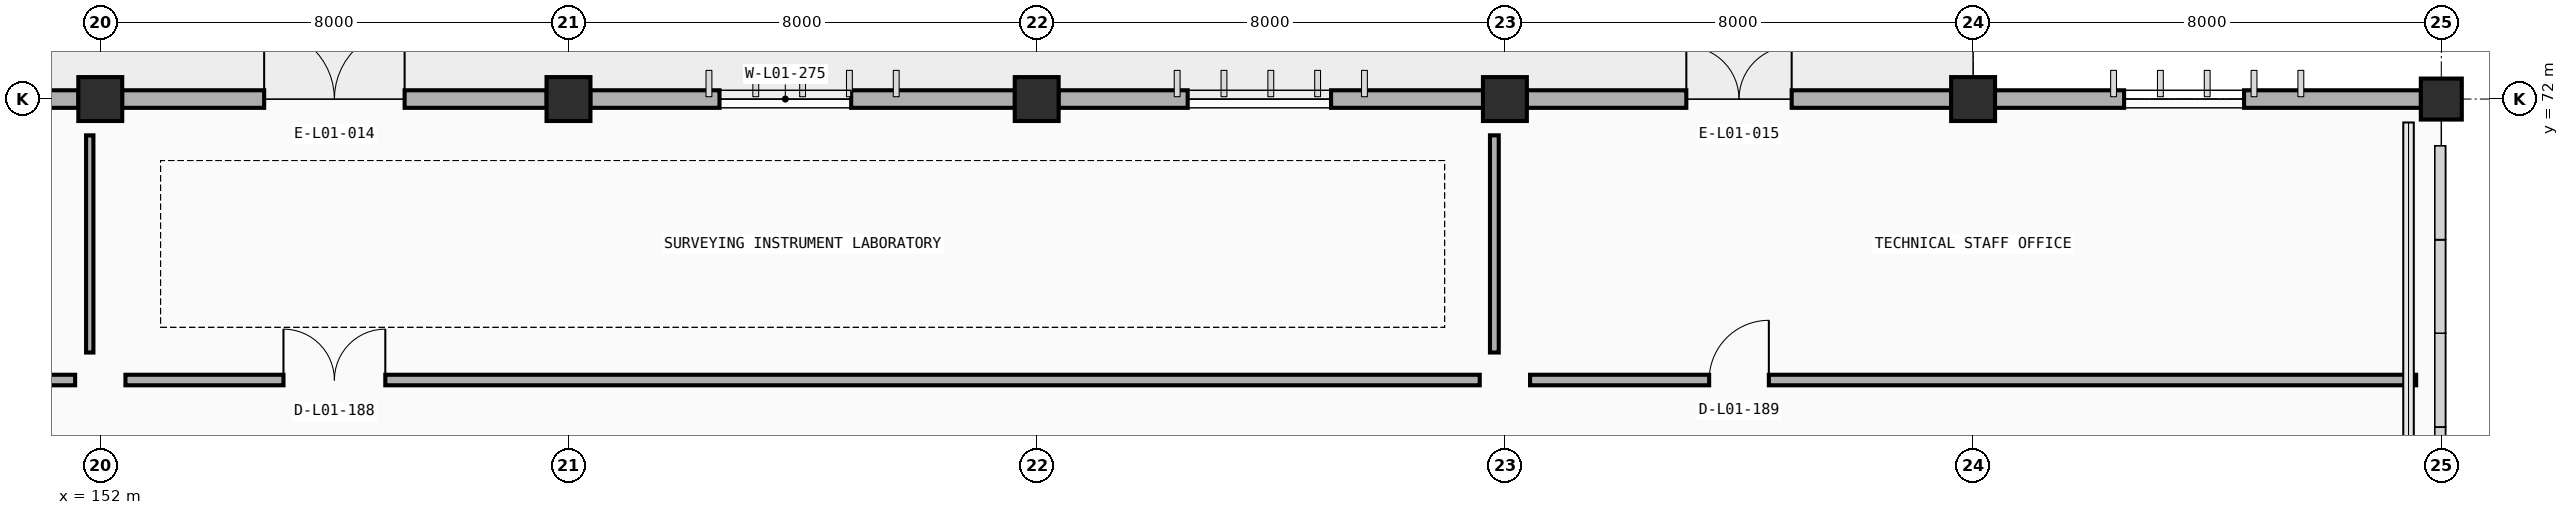
"""IFC4 building model, lengths in metres.
Left out: names, types, materials, properties, quantities, classifications, styles, units other than length and angle.
Written with IfcOpenShell. Run it as: python <this file> out.ifc"""

import sys

from ifc_helpers import new_model, si_unit, direction, frame, frame_2d, origin, origin_2d, place, context, subcontext, project, spatial, rectangle, extrude, element, fill, save


model = new_model("IFC4")
c1 = context("Model", 3, precision=1e-05, world=origin(), true_north=direction((0.0, 1.0)))
c2 = subcontext(c1, "Body", "Model", "MODEL_VIEW")
j1 = project(units=[si_unit("LENGTHUNIT", "METRE"), si_unit("PLANEANGLEUNIT", "RADIAN")], contexts=[c1])
p1 = place(None, origin())
s1 = spatial("IfcSite", under=j1, at=p1, CompositionType="ELEMENT")
p2 = place(p1, origin())
s2 = spatial("IfcBuilding", under=s1, at=p2, CompositionType="ELEMENT")
p3 = place(p2, origin())
s3 = spatial("IfcBuildingStorey", under=s2, at=p3, CompositionType="ELEMENT", Elevation=0.0)
for number, where, z_axis, x_axis in (
    (1, (152.0, 72.0, 0.0), (0.0, 0.0, 1.0), (1.0, 0.0, 0.0)),
    (2, (160.0, 72.0, 0.0), (0.0, 0.0, 1.0), (1.0, 0.0, 0.0)),
    (3, (168.0, 72.0, 0.0), (0.0, 0.0, 1.0), (1.0, 0.0, 0.0)),
    (4, (176.0, 72.0, 0.0), (0.0, 0.0, 1.0), (1.0, 0.0, 0.0)),
    (5, (184.0, 72.0, 0.0), (0.0, 0.0, 1.0), (1.0, 0.0, 0.0)),
):
    element("IfcColumn", number, at=place(p3, frame(where, z_axis=z_axis, x_axis=x_axis)), inside=s3, PredefinedType="COLUMN", context=c2, shape_type="SweptSolid", body=[
        extrude(rectangle(XDim=0.75, YDim=0.75, at=origin_2d()), origin(), (0.0, 0.0, 1.0), 4.8),
    ])
p4 = place(p3, frame((192.0, 72.0, 0.0), z_axis=(0.0, 0.0, 1.0), x_axis=(1.0, 0.0, 0.0)))
e6 = element("IfcColumn", 6, at=p4, inside=s3, PredefinedType="COLUMN", context=c2, shape_type="SweptSolid", body=[
    extrude(rectangle(XDim=0.7, YDim=0.7, at=origin_2d()), origin(), (0.0, 0.0, 1.0), 4.8),
])
p5 = place(p3, frame((144.372, 72.0, 0.0), z_axis=(0.0, 0.0, 1.0), x_axis=(1.0, 0.0, 0.0)))
e7 = element("IfcWall", 7, at=p5, inside=s3, PredefinedType="STANDARD", context=c2, shape_type="SweptSolid", body=[
    extrude(rectangle(XDim=7.256, YDim=0.3, at=frame_2d((3.628, 0.0))), origin(), (0.0, 0.0, 1.0), 3.91),
])
p6 = place(p5, frame((2.208, 0.0, 0.9)))
e8 = element("IfcOpeningElement", 8, at=p6, cuts=e7, PredefinedType="OPENING", context=c2, shape_type="SweptSolid", body=[
    extrude(rectangle(XDim=2.65, YDim=1.85, at=frame_2d((1.325, 0.925))), frame((0.0, 0.16, 0.0), z_axis=(0.0, -1.0, 0.0), x_axis=(1.0, 0.0, 0.0)), (0.0, 0.0, 1.0), 0.32),
])
p7 = place(p3, frame((152.372, 72.0, 0.0), z_axis=(0.0, 0.0, 1.0), x_axis=(1.0, 0.0, 0.0)))
e9 = element("IfcWall", 9, at=p7, inside=s3, PredefinedType="STANDARD", context=c2, shape_type="SweptSolid", body=[
    extrude(rectangle(XDim=7.256, YDim=0.3, at=frame_2d((3.628, 0.0))), origin(), (0.0, 0.0, 1.0), 3.91),
])
p8 = place(p7, frame((2.428, 0.0, 0.0)))
e10 = element("IfcOpeningElement", 10, at=p8, cuts=e9, PredefinedType="OPENING", context=c2, shape_type="SweptSolid", body=[
    extrude(rectangle(XDim=2.4, YDim=2.45, at=frame_2d((1.2, 1.225))), frame((0.0, 0.16, 0.0), z_axis=(0.0, -1.0, 0.0), x_axis=(1.0, 0.0, 0.0)), (0.0, 0.0, 1.0), 0.32),
])
p9 = place(p3, frame((160.372, 72.0, 0.0), z_axis=(0.0, 0.0, 1.0), x_axis=(1.0, 0.0, 0.0)))
e11 = element("IfcWall", 11, at=p9, inside=s3, PredefinedType="STANDARD", context=c2, shape_type="SweptSolid", body=[
    extrude(rectangle(XDim=7.256, YDim=0.3, at=frame_2d((3.628, 0.0))), origin(), (0.0, 0.0, 1.0), 3.91),
])
p10 = place(p9, frame((2.208, 0.0, 0.9)))
e12 = element("IfcOpeningElement", 12, at=p10, cuts=e11, PredefinedType="OPENING", context=c2, shape_type="SweptSolid", body=[
    extrude(rectangle(XDim=2.25, YDim=1.85, at=frame_2d((1.125, 0.925))), frame((0.0, 0.16, 0.0), z_axis=(0.0, -1.0, 0.0), x_axis=(1.0, 0.0, 0.0)), (0.0, 0.0, 1.0), 0.32),
])
p11 = place(p3, frame((168.372, 72.0, 0.0), z_axis=(0.0, 0.0, 1.0), x_axis=(1.0, 0.0, 0.0)))
e13 = element("IfcWall", 13, at=p11, inside=s3, PredefinedType="STANDARD", context=c2, shape_type="SweptSolid", body=[
    extrude(rectangle(XDim=7.256, YDim=0.3, at=frame_2d((3.628, 0.0))), origin(), (0.0, 0.0, 1.0), 3.91),
])
p12 = place(p11, frame((2.208, 0.0, 0.9)))
e14 = element("IfcOpeningElement", 14, at=p12, cuts=e13, PredefinedType="OPENING", context=c2, shape_type="SweptSolid", body=[
    extrude(rectangle(XDim=2.45, YDim=1.85, at=frame_2d((1.225, 0.925))), frame((0.0, 0.16, 0.0), z_axis=(0.0, -1.0, 0.0), x_axis=(1.0, 0.0, 0.0)), (0.0, 0.0, 1.0), 0.32),
])
p13 = place(p3, frame((176.372, 72.0, 0.0), z_axis=(0.0, 0.0, 1.0), x_axis=(1.0, 0.0, 0.0)))
e15 = element("IfcWall", 15, at=p13, inside=s3, PredefinedType="STANDARD", context=c2, shape_type="SweptSolid", body=[
    extrude(rectangle(XDim=7.256, YDim=0.3, at=frame_2d((3.628, 0.0))), origin(), (0.0, 0.0, 1.0), 3.91),
])
p14 = place(p13, frame((2.728, 0.0, 0.0)))
e16 = element("IfcOpeningElement", 16, at=p14, cuts=e15, PredefinedType="OPENING", context=c2, shape_type="SweptSolid", body=[
    extrude(rectangle(XDim=1.8, YDim=2.3, at=frame_2d((0.9, 1.15))), frame((0.0, 0.16, 0.0), z_axis=(0.0, -1.0, 0.0), x_axis=(1.0, 0.0, 0.0)), (0.0, 0.0, 1.0), 0.32),
])
p15 = place(p3, frame((184.372, 72.0, 0.0), z_axis=(0.0, 0.0, 1.0), x_axis=(1.0, 0.0, 0.0)))
e17 = element("IfcWall", 17, at=p15, inside=s3, PredefinedType="STANDARD", context=c2, shape_type="SweptSolid", body=[
    extrude(rectangle(XDim=7.281, YDim=0.3, at=frame_2d((3.641, 0.0))), origin(), (0.0, 0.0, 1.0), 3.91),
])
p16 = place(p15, frame((2.208, 0.0, 0.9)))
e18 = element("IfcOpeningElement", 18, at=p16, cuts=e17, PredefinedType="OPENING", context=c2, shape_type="SweptSolid", body=[
    extrude(rectangle(XDim=2.05, YDim=1.85, at=frame_2d((1.025, 0.925))), frame((0.0, 0.16, 0.0), z_axis=(0.0, -1.0, 0.0), x_axis=(1.0, 0.0, 0.0)), (0.0, 0.0, 1.0), 0.32),
])
p17 = place(p3, frame((191.76, 71.78, 0.0), z_axis=(0.0, 0.0, 1.0), x_axis=(-1.0, 0.0, 0.0)))
e19 = element("IfcWall", 19, at=p17, inside=s3, PredefinedType="PARAPET", context=c2, shape_type="SweptSolid", body=[
    extrude(rectangle(XDim=0.32, YDim=0.2, at=frame_2d((0.16, 0.0))), origin(), (0.0, 0.0, 1.0), 3.95),
])
p18 = place(p3, frame((128.43, 67.2, 0.0), z_axis=(0.0, 0.0, 1.0), x_axis=(1.0, 0.0, 0.0)))
e20 = element("IfcWall", 20, at=p18, inside=s3, PredefinedType="PARTITIONING", context=c2, shape_type="SweptSolid", body=[
    extrude(rectangle(XDim=23.14, YDim=0.18, at=frame_2d((11.57, 0.0))), origin(), (0.0, 0.0, 1.0), 3.9),
])
p19 = place(p18, frame((2.61, 0.0, 0.0)))
e21 = element("IfcOpeningElement", 21, at=p19, cuts=e20, PredefinedType="OPENING", context=c2, shape_type="SweptSolid", body=[
    extrude(rectangle(XDim=1.92, YDim=2.3, at=frame_2d((0.96, 1.15))), frame((0.0, 0.1, 0.0), z_axis=(0.0, -1.0, 0.0), x_axis=(1.0, 0.0, 0.0)), (0.0, 0.0, 1.0), 0.2),
])
p20 = place(p3, frame((151.82, 67.67, 0.0), z_axis=(0.0, 0.0, 1.0), x_axis=(0.0, 1.0, 0.0)))
e22 = element("IfcWall", 22, at=p20, inside=s3, PredefinedType="PARTITIONING", context=c2, shape_type="SweptSolid", body=[
    extrude(rectangle(XDim=3.71, YDim=0.125, at=frame_2d((1.855, 0.0))), origin(), (0.0, 0.0, 1.0), 3.76),
])
p21 = place(p3, frame((152.43, 67.2, 0.0), z_axis=(0.0, 0.0, 1.0), x_axis=(1.0, 0.0, 0.0)))
e23 = element("IfcWall", 23, at=p21, inside=s3, PredefinedType="PARTITIONING", context=c2, shape_type="SweptSolid", body=[
    extrude(rectangle(XDim=23.14, YDim=0.18, at=frame_2d((11.57, 0.0))), origin(), (0.0, 0.0, 1.0), 3.9),
])
p22 = place(p21, frame((2.7, 0.0, 0.0)))
e24 = element("IfcOpeningElement", 24, at=p22, cuts=e23, PredefinedType="OPENING", context=c2, shape_type="SweptSolid", body=[
    extrude(rectangle(XDim=1.74, YDim=2.22, at=frame_2d((0.87, 1.11))), frame((0.0, 0.1, 0.0), z_axis=(0.0, -1.0, 0.0), x_axis=(1.0, 0.0, 0.0)), (0.0, 0.0, 1.0), 0.2),
])
p23 = place(p3, frame((175.82, 67.67, 0.0), z_axis=(0.0, 0.0, 1.0), x_axis=(0.0, 1.0, 0.0)))
e25 = element("IfcWall", 25, at=p23, inside=s3, PredefinedType="PARTITIONING", context=c2, shape_type="SweptSolid", body=[
    extrude(rectangle(XDim=3.71, YDim=0.15, at=frame_2d((1.855, 0.0))), origin(), (0.0, 0.0, 1.0), 3.76),
])
p24 = place(p3, frame((176.43, 67.2, 0.0), z_axis=(0.0, 0.0, 1.0), x_axis=(1.0, 0.0, 0.0)))
e26 = element("IfcWall", 26, at=p24, inside=s3, PredefinedType="PARTITIONING", context=c2, shape_type="SweptSolid", body=[
    extrude(rectangle(XDim=15.14, YDim=0.18, at=frame_2d((7.57, 0.0))), origin(), (0.0, 0.0, 1.0), 3.9),
])
p25 = place(p24, frame((3.06, 0.0, 0.0)))
e27 = element("IfcOpeningElement", 27, at=p25, cuts=e26, PredefinedType="OPENING", context=c2, shape_type="SweptSolid", body=[
    extrude(rectangle(XDim=1.02, YDim=2.1, at=frame_2d((0.51, 1.05))), frame((0.0, 0.1, 0.0), z_axis=(0.0, -1.0, 0.0), x_axis=(1.0, 0.0, 0.0)), (0.0, 0.0, 1.0), 0.2),
])
p26 = place(p8, origin())
e28 = element("IfcDoor", 28, at=p26, inside=s3, OperationType="DOUBLE_DOOR_SINGLE_SWING", PredefinedType="DOOR", context=c2, shape_type="SweptSolid", body=[
    extrude(rectangle(XDim=2.4, YDim=2.45, at=frame_2d((1.2, 1.225))), frame((0.0, 0.025, 0.0), z_axis=(0.0, -1.0, 0.0), x_axis=(1.0, 0.0, 0.0)), (0.0, 0.0, 1.0), 0.05),
])
fill(e10, e28)
p27 = place(p10, origin())
e29 = element("IfcWindow", 29, at=p27, inside=s3, PartitioningType="DOUBLE_PANEL_VERTICAL", PredefinedType="WINDOW", context=c2, shape_type="SweptSolid", body=[
    extrude(rectangle(XDim=2.25, YDim=1.85, at=frame_2d((1.125, 0.925))), frame((0.0, 0.03, 0.0), z_axis=(0.0, -1.0, 0.0), x_axis=(1.0, 0.0, 0.0)), (0.0, 0.0, 1.0), 0.06),
])
fill(e12, e29)
p28 = place(p12, origin())
e30 = element("IfcWindow", 30, at=p28, inside=s3, PartitioningType="DOUBLE_PANEL_VERTICAL", PredefinedType="WINDOW", context=c2, shape_type="SweptSolid", body=[
    extrude(rectangle(XDim=2.45, YDim=1.85, at=frame_2d((1.225, 0.925))), frame((0.0, 0.03, 0.0), z_axis=(0.0, -1.0, 0.0), x_axis=(1.0, 0.0, 0.0)), (0.0, 0.0, 1.0), 0.06),
])
fill(e14, e30)
p29 = place(p14, origin())
e31 = element("IfcDoor", 31, at=p29, inside=s3, OperationType="DOUBLE_DOOR_SINGLE_SWING", PredefinedType="DOOR", context=c2, shape_type="SweptSolid", body=[
    extrude(rectangle(XDim=1.8, YDim=2.3, at=frame_2d((0.9, 1.15))), frame((0.0, 0.025, 0.0), z_axis=(0.0, -1.0, 0.0), x_axis=(1.0, 0.0, 0.0)), (0.0, 0.0, 1.0), 0.05),
])
fill(e16, e31)
p30 = place(p16, origin())
e32 = element("IfcWindow", 32, at=p30, inside=s3, PartitioningType="DOUBLE_PANEL_VERTICAL", PredefinedType="WINDOW", context=c2, shape_type="SweptSolid", body=[
    extrude(rectangle(XDim=2.05, YDim=1.85, at=frame_2d((1.025, 0.925))), frame((0.0, 0.03, 0.0), z_axis=(0.0, -1.0, 0.0), x_axis=(1.0, 0.0, 0.0)), (0.0, 0.0, 1.0), 0.06),
])
fill(e18, e32)
p31 = place(p22, origin())
e33 = element("IfcDoor", 33, at=p31, inside=s3, OperationType="DOUBLE_DOOR_SINGLE_SWING", PredefinedType="DOOR", context=c2, shape_type="SweptSolid", body=[
    extrude(rectangle(XDim=1.74, YDim=2.22, at=frame_2d((0.87, 1.11))), frame((0.0, 0.025, 0.0), z_axis=(0.0, -1.0, 0.0), x_axis=(1.0, 0.0, 0.0)), (0.0, 0.0, 1.0), 0.05),
])
fill(e24, e33)
p32 = place(p25, origin())
e34 = element("IfcDoor", 34, at=p32, inside=s3, OperationType="SINGLE_SWING_RIGHT", PredefinedType="DOOR", context=c2, shape_type="SweptSolid", body=[
    extrude(rectangle(XDim=1.02, YDim=2.1, at=frame_2d((0.51, 1.05))), frame((0.0, 0.025, 0.0), z_axis=(0.0, -1.0, 0.0), x_axis=(1.0, 0.0, 0.0)), (0.0, 0.0, 1.0), 0.05),
])
fill(e27, e34)
save(model, sys.argv[1])
